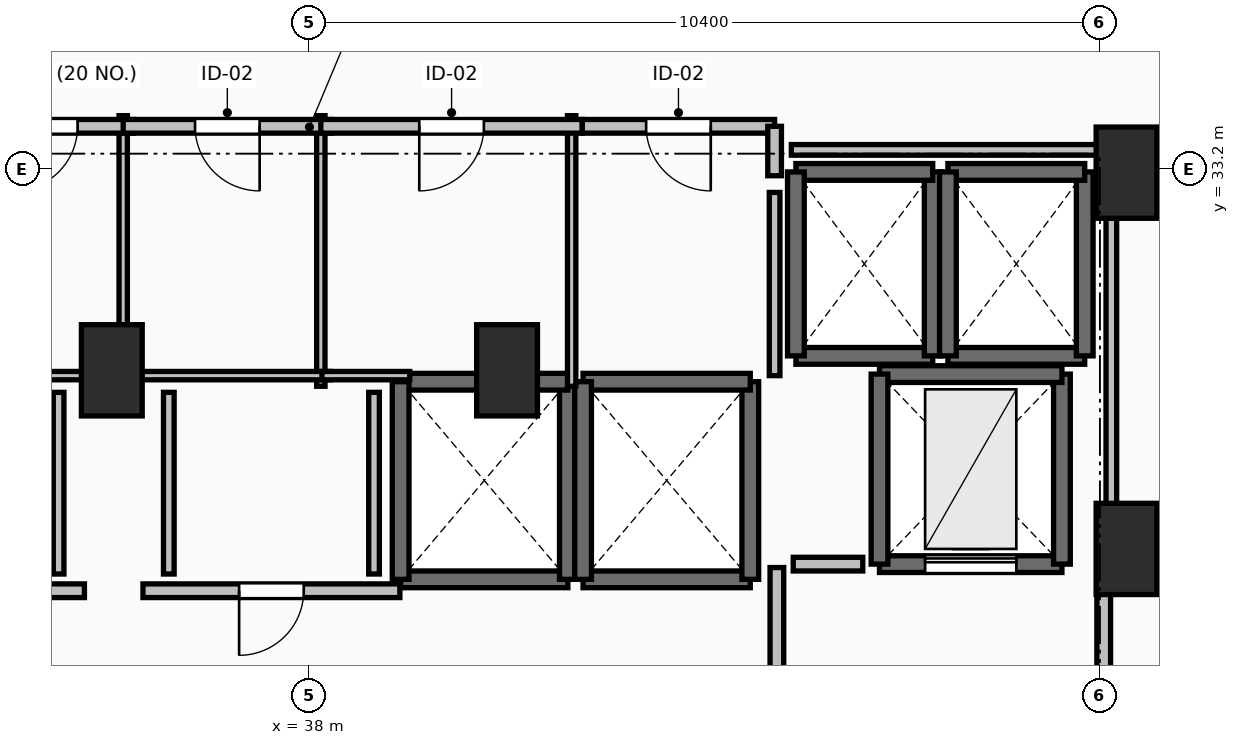
"""IFC4 building model, lengths in metres.
Left out: names, types, materials, properties, quantities, classifications, styles, units other than length and angle.
Written with IfcOpenShell. Run it as: python <this file> out.ifc"""

import sys

from ifc_helpers import new_model, si_unit, direction, frame, frame_2d, origin, origin_2d, place, context, subcontext, project, spatial, rectangle, extrude, element, fill, save


model = new_model("IFC4")
c1 = context("Model", 3, precision=1e-05, world=origin(), true_north=direction((0.0, 1.0)))
c2 = subcontext(c1, "Body", "Model", "MODEL_VIEW")
j1 = project(units=[si_unit("LENGTHUNIT", "METRE"), si_unit("PLANEANGLEUNIT", "RADIAN")], contexts=[c1])
p1 = place(None, origin())
s1 = spatial("IfcSite", under=j1, at=p1, CompositionType="ELEMENT")
p2 = place(p1, origin())
s2 = spatial("IfcBuilding", under=s1, at=p2, CompositionType="ELEMENT")
p3 = place(p2, frame((0.0, 0.0, 157.1)))
s3 = spatial("IfcBuildingStorey", under=s2, at=p3, CompositionType="ELEMENT", Elevation=157.1)
for number, where, z_axis, x_axis in (
    (1, (48.75, 33.15, 0.0), (0.0, 0.0, 1.0), (1.0, 0.0, 0.0)),
    (2, (48.75, 28.2, 0.0), (0.0, 0.0, 1.0), (1.0, 0.0, 0.0)),
    (3, (35.4, 30.55, 0.0), (0.0, 0.0, 1.0), (1.0, 0.0, 0.0)),
    (4, (40.6, 30.55, 0.0), (0.0, 0.0, 1.0), (1.0, 0.0, 0.0)),
):
    element("IfcColumn", number, at=place(p3, frame(where, z_axis=z_axis, x_axis=x_axis)), inside=s3, PredefinedType="PILASTER", context=c2, shape_type="SweptSolid", body=[
        extrude(rectangle(XDim=0.8, YDim=1.2, at=origin_2d()), origin(), (0.0, 0.0, 1.0), 3.5),
    ])
p4 = place(p3, frame((39.2, 27.8, 0.0), z_axis=(0.0, 0.0, 1.0), x_axis=(1.0, 0.0, 0.0)))
e5 = element("IfcWall", 5, at=p4, inside=s3, PredefinedType="SOLIDWALL", context=c2, shape_type="SweptSolid", body=[
    extrude(rectangle(XDim=2.2, YDim=0.22, at=frame_2d((1.1, 0.0))), origin(), (0.0, 0.0, 1.0), 3.24),
])
p5 = place(p3, frame((41.4, 27.8, 0.0), z_axis=(0.0, 0.0, 1.0), x_axis=(0.0, 1.0, 0.0)))
e6 = element("IfcWall", 6, at=p5, inside=s3, PredefinedType="SOLIDWALL", context=c2, shape_type="SweptSolid", body=[
    extrude(rectangle(XDim=2.6, YDim=0.22, at=frame_2d((1.3, 0.0))), origin(), (0.0, 0.0, 1.0), 3.24),
])
p6 = place(p3, frame((41.4, 30.4, 0.0), z_axis=(0.0, 0.0, 1.0), x_axis=(-1.0, 0.0, 0.0)))
e7 = element("IfcWall", 7, at=p6, inside=s3, PredefinedType="SOLIDWALL", context=c2, shape_type="SweptSolid", body=[
    extrude(rectangle(XDim=2.2, YDim=0.22, at=frame_2d((1.1, 0.0))), origin(), (0.0, 0.0, 1.0), 3.24),
])
p7 = place(p3, frame((39.2, 30.4, 0.0), z_axis=(0.0, 0.0, 1.0), x_axis=(0.0, -1.0, 0.0)))
e8 = element("IfcWall", 8, at=p7, inside=s3, PredefinedType="SOLIDWALL", context=c2, shape_type="SweptSolid", body=[
    extrude(rectangle(XDim=2.6, YDim=0.22, at=frame_2d((1.3, 0.0))), origin(), (0.0, 0.0, 1.0), 3.24),
])
p8 = place(p3, frame((41.6, 27.8, 0.0), z_axis=(0.0, 0.0, 1.0), x_axis=(1.0, 0.0, 0.0)))
e9 = element("IfcWall", 9, at=p8, inside=s3, PredefinedType="SOLIDWALL", context=c2, shape_type="SweptSolid", body=[
    extrude(rectangle(XDim=2.2, YDim=0.22, at=frame_2d((1.1, 0.0))), origin(), (0.0, 0.0, 1.0), 3.24),
])
p9 = place(p3, frame((43.8, 27.8, 0.0), z_axis=(0.0, 0.0, 1.0), x_axis=(0.0, 1.0, 0.0)))
e10 = element("IfcWall", 10, at=p9, inside=s3, PredefinedType="SOLIDWALL", context=c2, shape_type="SweptSolid", body=[
    extrude(rectangle(XDim=2.6, YDim=0.22, at=frame_2d((1.3, 0.0))), origin(), (0.0, 0.0, 1.0), 3.24),
])
p10 = place(p3, frame((43.8, 30.4, 0.0), z_axis=(0.0, 0.0, 1.0), x_axis=(-1.0, 0.0, 0.0)))
e11 = element("IfcWall", 11, at=p10, inside=s3, PredefinedType="SOLIDWALL", context=c2, shape_type="SweptSolid", body=[
    extrude(rectangle(XDim=2.2, YDim=0.22, at=frame_2d((1.1, 0.0))), origin(), (0.0, 0.0, 1.0), 3.24),
])
p11 = place(p3, frame((41.6, 30.4, 0.0), z_axis=(0.0, 0.0, 1.0), x_axis=(0.0, -1.0, 0.0)))
e12 = element("IfcWall", 12, at=p11, inside=s3, PredefinedType="SOLIDWALL", context=c2, shape_type="SweptSolid", body=[
    extrude(rectangle(XDim=2.6, YDim=0.22, at=frame_2d((1.3, 0.0))), origin(), (0.0, 0.0, 1.0), 3.24),
])
p12 = place(p3, frame((44.4, 30.74, 0.0), z_axis=(0.0, 0.0, 1.0), x_axis=(1.0, 0.0, 0.0)))
e13 = element("IfcWall", 13, at=p12, inside=s3, PredefinedType="SOLIDWALL", context=c2, shape_type="SweptSolid", body=[
    extrude(rectangle(XDim=1.8, YDim=0.22, at=frame_2d((0.9, 0.0))), origin(), (0.0, 0.0, 1.0), 3.24),
])
p13 = place(p3, frame((46.2, 30.74, 0.0), z_axis=(0.0, 0.0, 1.0), x_axis=(0.0, 1.0, 0.0)))
e14 = element("IfcWall", 14, at=p13, inside=s3, PredefinedType="SOLIDWALL", context=c2, shape_type="SweptSolid", body=[
    extrude(rectangle(XDim=2.42, YDim=0.22, at=frame_2d((1.21, 0.0))), origin(), (0.0, 0.0, 1.0), 3.24),
])
p14 = place(p3, frame((46.2, 33.16, 0.0), z_axis=(0.0, 0.0, 1.0), x_axis=(-1.0, 0.0, 0.0)))
e15 = element("IfcWall", 15, at=p14, inside=s3, PredefinedType="SOLIDWALL", context=c2, shape_type="SweptSolid", body=[
    extrude(rectangle(XDim=1.8, YDim=0.22, at=frame_2d((0.9, 0.0))), origin(), (0.0, 0.0, 1.0), 3.24),
])
p15 = place(p3, frame((44.4, 33.16, 0.0), z_axis=(0.0, 0.0, 1.0), x_axis=(0.0, -1.0, 0.0)))
e16 = element("IfcWall", 16, at=p15, inside=s3, PredefinedType="SOLIDWALL", context=c2, shape_type="SweptSolid", body=[
    extrude(rectangle(XDim=2.42, YDim=0.22, at=frame_2d((1.21, 0.0))), origin(), (0.0, 0.0, 1.0), 3.24),
])
p16 = place(p3, frame((46.4, 30.74, 0.0), z_axis=(0.0, 0.0, 1.0), x_axis=(1.0, 0.0, 0.0)))
e17 = element("IfcWall", 17, at=p16, inside=s3, PredefinedType="SOLIDWALL", context=c2, shape_type="SweptSolid", body=[
    extrude(rectangle(XDim=1.8, YDim=0.22, at=frame_2d((0.9, 0.0))), origin(), (0.0, 0.0, 1.0), 3.24),
])
p17 = place(p3, frame((48.2, 30.74, 0.0), z_axis=(0.0, 0.0, 1.0), x_axis=(0.0, 1.0, 0.0)))
e18 = element("IfcWall", 18, at=p17, inside=s3, PredefinedType="SOLIDWALL", context=c2, shape_type="SweptSolid", body=[
    extrude(rectangle(XDim=2.42, YDim=0.22, at=frame_2d((1.21, 0.0))), origin(), (0.0, 0.0, 1.0), 3.24),
])
p18 = place(p3, frame((48.2, 33.16, 0.0), z_axis=(0.0, 0.0, 1.0), x_axis=(-1.0, 0.0, 0.0)))
e19 = element("IfcWall", 19, at=p18, inside=s3, PredefinedType="SOLIDWALL", context=c2, shape_type="SweptSolid", body=[
    extrude(rectangle(XDim=1.8, YDim=0.22, at=frame_2d((0.9, 0.0))), origin(), (0.0, 0.0, 1.0), 3.24),
])
p19 = place(p3, frame((46.4, 33.16, 0.0), z_axis=(0.0, 0.0, 1.0), x_axis=(0.0, -1.0, 0.0)))
e20 = element("IfcWall", 20, at=p19, inside=s3, PredefinedType="SOLIDWALL", context=c2, shape_type="SweptSolid", body=[
    extrude(rectangle(XDim=2.42, YDim=0.22, at=frame_2d((1.21, 0.0))), origin(), (0.0, 0.0, 1.0), 3.24),
])
p20 = place(p3, frame((45.5, 28.0, 0.0), z_axis=(0.0, 0.0, 1.0), x_axis=(1.0, 0.0, 0.0)))
e21 = element("IfcWall", 21, at=p20, inside=s3, PredefinedType="SHEAR", context=c2, shape_type="SweptSolid", body=[
    extrude(rectangle(XDim=2.4, YDim=0.22, at=frame_2d((1.2, 0.0))), origin(), (0.0, 0.0, 1.0), 3.24),
])
p21 = place(p20, frame((0.6, 0.0, 0.0)))
e22 = element("IfcOpeningElement", 22, at=p21, cuts=e21, PredefinedType="OPENING", context=c2, shape_type="SweptSolid", body=[
    extrude(rectangle(XDim=1.2, YDim=2.2, at=frame_2d((0.6, 1.1))), frame((0.0, 0.125, 0.0), z_axis=(0.0, -1.0, 0.0), x_axis=(1.0, 0.0, 0.0)), (0.0, 0.0, 1.0), 0.25),
])
p22 = place(p3, frame((47.9, 28.0, 0.0), z_axis=(0.0, 0.0, 1.0), x_axis=(0.0, 1.0, 0.0)))
e23 = element("IfcWall", 23, at=p22, inside=s3, PredefinedType="SHEAR", context=c2, shape_type="SweptSolid", body=[
    extrude(rectangle(XDim=2.5, YDim=0.22, at=frame_2d((1.25, 0.0))), origin(), (0.0, 0.0, 1.0), 3.24),
])
p23 = place(p3, frame((47.9, 30.5, 0.0), z_axis=(0.0, 0.0, 1.0), x_axis=(-1.0, 0.0, 0.0)))
e24 = element("IfcWall", 24, at=p23, inside=s3, PredefinedType="SHEAR", context=c2, shape_type="SweptSolid", body=[
    extrude(rectangle(XDim=2.4, YDim=0.22, at=frame_2d((1.2, 0.0))), origin(), (0.0, 0.0, 1.0), 3.24),
])
p24 = place(p3, frame((45.5, 30.5, 0.0), z_axis=(0.0, 0.0, 1.0), x_axis=(0.0, -1.0, 0.0)))
e25 = element("IfcWall", 25, at=p24, inside=s3, PredefinedType="SHEAR", context=c2, shape_type="SweptSolid", body=[
    extrude(rectangle(XDim=2.5, YDim=0.22, at=frame_2d((1.25, 0.0))), origin(), (0.0, 0.0, 1.0), 3.24),
])
p25 = place(p3, frame((44.15, 27.955, 0.0), z_axis=(0.0, 0.0, 1.0), x_axis=(0.0, -1.0, 0.0)))
e26 = element("IfcWall", 26, at=p25, inside=s3, PredefinedType="PARTITIONING", context=c2, shape_type="SweptSolid", body=[
    extrude(rectangle(XDim=3.91, YDim=0.18, at=frame_2d((1.955, 0.0))), origin(), (0.0, 0.0, 1.0), 3.24),
])
p26 = place(p25, frame((1.355, 0.0, 0.0)))
e27 = element("IfcOpeningElement", 27, at=p26, cuts=e26, PredefinedType="OPENING", context=c2, shape_type="SweptSolid", body=[
    extrude(rectangle(XDim=1.2, YDim=2.15, at=frame_2d((0.6, 1.075))), frame((0.0, 0.105, 0.0), z_axis=(0.0, -1.0, 0.0), x_axis=(1.0, 0.0, 0.0)), (0.0, 0.0, 1.0), 0.21),
])
p27 = place(p3, frame((48.45, 23.95, 0.0), z_axis=(0.0, 0.0, 1.0), x_axis=(0.0, 1.0, 0.0)))
e28 = element("IfcWall", 28, at=p27, inside=s3, PredefinedType="PARTITIONING", context=c2, shape_type="SweptSolid", body=[
    extrude(rectangle(XDim=4.05, YDim=0.18, at=frame_2d((2.025, 0.0))), origin(), (0.0, 0.0, 1.0), 3.24),
])
p28 = place(p27, frame((1.425, 0.0, 0.0)))
e29 = element("IfcOpeningElement", 29, at=p28, cuts=e28, PredefinedType="OPENING", context=c2, shape_type="SweptSolid", body=[
    extrude(rectangle(XDim=1.2, YDim=2.15, at=frame_2d((0.6, 1.075))), frame((0.0, 0.105, 0.0), z_axis=(0.0, -1.0, 0.0), x_axis=(1.0, 0.0, 0.0)), (0.0, 0.0, 1.0), 0.21),
])
p29 = place(p3, frame((35.04, 27.65, 0.0), z_axis=(0.0, 0.0, 1.0), x_axis=(-1.0, 0.0, 0.0)))
e30 = element("IfcWall", 30, at=p29, inside=s3, PredefinedType="PARTITIONING", context=c2, shape_type="SweptSolid", body=[
    extrude(rectangle(XDim=3.04, YDim=0.18, at=frame_2d((1.52, 0.0))), origin(), (0.0, 0.0, 1.0), 3.24),
])
p30 = place(p29, frame((1.02, 0.0, 0.0)))
e31 = element("IfcOpeningElement", 31, at=p30, cuts=e30, PredefinedType="OPENING", context=c2, shape_type="SweptSolid", body=[
    extrude(rectangle(XDim=1.0, YDim=2.15, at=frame_2d((0.5, 1.075))), frame((0.0, 0.105, 0.0), z_axis=(0.0, -1.0, 0.0), x_axis=(1.0, 0.0, 0.0)), (0.0, 0.0, 1.0), 0.21),
])
p31 = place(p3, frame((39.19, 27.65, 0.0), z_axis=(0.0, 0.0, 1.0), x_axis=(-1.0, 0.0, 0.0)))
e32 = element("IfcWall", 32, at=p31, inside=s3, PredefinedType="PARTITIONING", context=c2, shape_type="SweptSolid", body=[
    extrude(rectangle(XDim=3.38, YDim=0.18, at=frame_2d((1.69, 0.0))), origin(), (0.0, 0.0, 1.0), 3.24),
])
p32 = place(p31, frame((1.265, 0.0, 0.0)))
e33 = element("IfcOpeningElement", 33, at=p32, cuts=e32, PredefinedType="OPENING", context=c2, shape_type="SweptSolid", body=[
    extrude(rectangle(XDim=0.85, YDim=2.1, at=frame_2d((0.425, 1.05))), frame((0.0, 0.105, 0.0), z_axis=(0.0, -1.0, 0.0), x_axis=(1.0, 0.0, 0.0)), (0.0, 0.0, 1.0), 0.21),
])
p33 = place(p3, frame((35.55, 30.34, 0.0), z_axis=(0.0, 0.0, 1.0), x_axis=(0.0, 1.0, 0.0)))
e34 = element("IfcWall", 34, at=p33, inside=s3, PredefinedType="PARTITIONING", context=c2, shape_type="SweptSolid", body=[
    extrude(rectangle(XDim=3.56, YDim=0.11, at=frame_2d((1.78, 0.0))), origin(), (0.0, 0.0, 1.0), 2.432),
])
p34 = place(p3, frame((33.36, 30.48, 0.0), z_axis=(0.0, 0.0, 1.0), x_axis=(1.0, 0.0, 0.0)))
e35 = element("IfcWall", 35, at=p34, inside=s3, PredefinedType="PARTITIONING", context=c2, shape_type="SweptSolid", body=[
    extrude(rectangle(XDim=1.81, YDim=0.11, at=frame_2d((0.905, 0.0))), origin(), (0.0, 0.0, 1.0), 3.24),
])
p35 = place(p3, frame((35.69, 33.76, 0.0), z_axis=(0.0, 0.0, 1.0), x_axis=(-1.0, 0.0, 0.0)))
e36 = element("IfcWall", 36, at=p35, inside=s3, PredefinedType="PARTITIONING", context=c2, shape_type="SweptSolid", body=[
    extrude(rectangle(XDim=2.33, YDim=0.18, at=frame_2d((1.165, 0.0))), origin(), (0.0, 0.0, 1.0), 3.24),
])
p36 = place(p35, frame((0.74, 0.0, 0.0)))
e37 = element("IfcOpeningElement", 37, at=p36, cuts=e36, PredefinedType="OPENING", context=c2, shape_type="SweptSolid", body=[
    extrude(rectangle(XDim=0.85, YDim=2.1, at=frame_2d((0.425, 1.05))), frame((0.0, 0.105, 0.0), z_axis=(0.0, -1.0, 0.0), x_axis=(1.0, 0.0, 0.0)), (0.0, 0.0, 1.0), 0.21),
])
p37 = place(p3, frame((38.15, 30.34, 0.0), z_axis=(0.0, 0.0, 1.0), x_axis=(0.0, 1.0, 0.0)))
e38 = element("IfcWall", 38, at=p37, inside=s3, PredefinedType="PARTITIONING", context=c2, shape_type="SweptSolid", body=[
    extrude(rectangle(XDim=3.56, YDim=0.11, at=frame_2d((1.78, 0.0))), origin(), (0.0, 0.0, 1.0), 2.432),
])
p38 = place(p3, frame((35.68, 30.48, 0.0), z_axis=(0.0, 0.0, 1.0), x_axis=(1.0, 0.0, 0.0)))
e39 = element("IfcWall", 39, at=p38, inside=s3, PredefinedType="PARTITIONING", context=c2, shape_type="SweptSolid", body=[
    extrude(rectangle(XDim=2.595, YDim=0.11, at=frame_2d((1.297, 0.0))), origin(), (0.0, 0.0, 1.0), 2.432),
])
p39 = place(p3, frame((38.29, 33.76, 0.0), z_axis=(0.0, 0.0, 1.0), x_axis=(-1.0, 0.0, 0.0)))
e40 = element("IfcWall", 40, at=p39, inside=s3, PredefinedType="PARTITIONING", context=c2, shape_type="SweptSolid", body=[
    extrude(rectangle(XDim=2.74, YDim=0.18, at=frame_2d((1.37, 0.0))), origin(), (0.0, 0.0, 1.0), 3.24),
])
p40 = place(p39, frame((0.945, 0.0, 0.0)))
e41 = element("IfcOpeningElement", 41, at=p40, cuts=e40, PredefinedType="OPENING", context=c2, shape_type="SweptSolid", body=[
    extrude(rectangle(XDim=0.85, YDim=2.1, at=frame_2d((0.425, 1.05))), frame((0.0, 0.105, 0.0), z_axis=(0.0, -1.0, 0.0), x_axis=(1.0, 0.0, 0.0)), (0.0, 0.0, 1.0), 0.21),
])
p41 = place(p3, frame((41.45, 30.34, 0.0), z_axis=(0.0, 0.0, 1.0), x_axis=(0.0, 1.0, 0.0)))
e42 = element("IfcWall", 42, at=p41, inside=s3, PredefinedType="PARTITIONING", context=c2, shape_type="SweptSolid", body=[
    extrude(rectangle(XDim=3.56, YDim=0.11, at=frame_2d((1.78, 0.0))), origin(), (0.0, 0.0, 1.0), 3.24),
])
p42 = place(p3, frame((38.165, 30.48, 0.0), z_axis=(0.0, 0.0, 1.0), x_axis=(1.0, 0.0, 0.0)))
e43 = element("IfcWall", 43, at=p42, inside=s3, PredefinedType="PARTITIONING", context=c2, shape_type="SweptSolid", body=[
    extrude(rectangle(XDim=1.155, YDim=0.11, at=frame_2d((0.578, 0.0))), origin(), (0.0, 0.0, 1.0), 2.432),
])
p43 = place(p3, frame((41.59, 33.76, 0.0), z_axis=(0.0, 0.0, 1.0), x_axis=(-1.0, 0.0, 0.0)))
e44 = element("IfcWall", 44, at=p43, inside=s3, PredefinedType="PARTITIONING", context=c2, shape_type="SweptSolid", body=[
    extrude(rectangle(XDim=3.44, YDim=0.18, at=frame_2d((1.72, 0.0))), origin(), (0.0, 0.0, 1.0), 3.24),
])
p44 = place(p43, frame((1.295, 0.0, 0.0)))
e45 = element("IfcOpeningElement", 45, at=p44, cuts=e44, PredefinedType="OPENING", context=c2, shape_type="SweptSolid", body=[
    extrude(rectangle(XDim=0.85, YDim=2.1, at=frame_2d((0.425, 1.05))), frame((0.0, 0.105, 0.0), z_axis=(0.0, -1.0, 0.0), x_axis=(1.0, 0.0, 0.0)), (0.0, 0.0, 1.0), 0.21),
])
p45 = place(p3, frame((44.12, 33.76, 0.0), z_axis=(0.0, 0.0, 1.0), x_axis=(-1.0, 0.0, 0.0)))
e46 = element("IfcWall", 46, at=p45, inside=s3, PredefinedType="PARTITIONING", context=c2, shape_type="SweptSolid", body=[
    extrude(rectangle(XDim=2.53, YDim=0.18, at=frame_2d((1.265, 0.0))), origin(), (0.0, 0.0, 1.0), 3.24),
])
p46 = place(p45, frame((0.84, 0.0, 0.0)))
e47 = element("IfcOpeningElement", 47, at=p46, cuts=e46, PredefinedType="OPENING", context=c2, shape_type="SweptSolid", body=[
    extrude(rectangle(XDim=0.85, YDim=2.1, at=frame_2d((0.425, 1.05))), frame((0.0, 0.105, 0.0), z_axis=(0.0, -1.0, 0.0), x_axis=(1.0, 0.0, 0.0)), (0.0, 0.0, 1.0), 0.21),
])
p47 = place(p3, frame((44.12, 33.11, 0.0), z_axis=(0.0, 0.0, 1.0), x_axis=(0.0, 1.0, 0.0)))
e48 = element("IfcWall", 48, at=p47, inside=s3, PredefinedType="PARTITIONING", context=c2, shape_type="SweptSolid", body=[
    extrude(rectangle(XDim=0.65, YDim=0.18, at=frame_2d((0.325, 0.0))), origin(), (0.0, 0.0, 1.0), 3.24),
])
p48 = place(p3, frame((45.28, 28.0, 0.0), z_axis=(0.0, 0.0, 1.0), x_axis=(-1.0, 0.0, 0.0)))
e49 = element("IfcWall", 49, at=p48, inside=s3, PredefinedType="PARTITIONING", context=c2, shape_type="SweptSolid", body=[
    extrude(rectangle(XDim=0.915, YDim=0.18, at=frame_2d((0.458, 0.0))), origin(), (0.0, 0.0, 1.0), 3.24),
])
p49 = place(p3, frame((44.12, 30.48, 0.0), z_axis=(0.0, 0.0, 1.0), x_axis=(0.0, 1.0, 0.0)))
e50 = element("IfcWall", 50, at=p49, inside=s3, PredefinedType="PARTITIONING", context=c2, shape_type="SweptSolid", body=[
    extrude(rectangle(XDim=2.41, YDim=0.14, at=frame_2d((1.205, 0.0))), origin(), (0.0, 0.0, 1.0), 3.24),
])
for number, where, z_axis, x_axis in (
    (51, (34.7, 27.87, 0.0), (0.0, 0.0, 1.0), (0.0, 1.0, 0.0)),
    (52, (36.15, 30.26, 0.0), (0.0, 0.0, 1.0), (0.0, -1.0, 0.0)),
    (53, (38.85, 27.87, 0.0), (0.0, 0.0, 1.0), (0.0, 1.0, 0.0)),
):
    element("IfcWall", number, at=place(p3, frame(where, z_axis=z_axis, x_axis=x_axis)), inside=s3, PredefinedType="PARTITIONING", context=c2, shape_type="SweptSolid", body=[
        extrude(rectangle(XDim=2.39, YDim=0.14, at=frame_2d((1.195, 0.0))), origin(), (0.0, 0.0, 1.0), 3.24),
    ])
p50 = place(p3, frame((48.55, 28.196, 0.0), z_axis=(0.0, 0.0, 1.0), x_axis=(0.0, 1.0, 0.0)))
e54 = element("IfcWall", 54, at=p50, inside=s3, PredefinedType="PARTITIONING", context=c2, shape_type="SweptSolid", body=[
    extrude(rectangle(XDim=5.254, YDim=0.14, at=frame_2d((2.627, 0.0))), origin(), (0.0, 0.0, 1.0), 2.432),
])
p51 = place(p3, frame((48.55, 33.45, 0.0), z_axis=(0.0, 0.0, 1.0), x_axis=(-1.0, 0.0, 0.0)))
e55 = element("IfcWall", 55, at=p51, inside=s3, PredefinedType="PARTITIONING", context=c2, shape_type="SweptSolid", body=[
    extrude(rectangle(XDim=4.21, YDim=0.14, at=frame_2d((2.105, 0.0))), origin(), (0.0, 0.0, 1.0), 2.432),
])
p52 = place(p21, origin())
e56 = element("IfcDoor", 56, at=p52, inside=s3, OperationType="SLIDING_TO_LEFT", PredefinedType="DOOR", context=c2, shape_type="SweptSolid", body=[
    extrude(rectangle(XDim=1.2, YDim=2.2, at=frame_2d((0.6, 1.1))), frame((0.0, 0.025, 0.0), z_axis=(0.0, -1.0, 0.0), x_axis=(1.0, 0.0, 0.0)), (0.0, 0.0, 1.0), 0.05),
])
fill(e22, e56)
p53 = place(p32, origin())
e57 = element("IfcDoor", 57, at=p53, inside=s3, OperationType="SINGLE_SWING_RIGHT", PredefinedType="DOOR", context=c2, shape_type="SweptSolid", body=[
    extrude(rectangle(XDim=0.85, YDim=2.1, at=frame_2d((0.425, 1.05))), frame((0.0, 0.025, 0.0), z_axis=(0.0, -1.0, 0.0), x_axis=(1.0, 0.0, 0.0)), (0.0, 0.0, 1.0), 0.05),
])
fill(e33, e57)
p54 = place(p36, origin())
e58 = element("IfcDoor", 58, at=p54, inside=s3, OperationType="SINGLE_SWING_RIGHT", PredefinedType="DOOR", context=c2, shape_type="SweptSolid", body=[
    extrude(rectangle(XDim=0.85, YDim=2.1, at=frame_2d((0.425, 1.05))), frame((0.0, 0.025, 0.0), z_axis=(0.0, -1.0, 0.0), x_axis=(1.0, 0.0, 0.0)), (0.0, 0.0, 1.0), 0.05),
])
fill(e37, e58)
p55 = place(p40, origin())
e59 = element("IfcDoor", 59, at=p55, inside=s3, OperationType="SINGLE_SWING_LEFT", PredefinedType="DOOR", context=c2, shape_type="SweptSolid", body=[
    extrude(rectangle(XDim=0.85, YDim=2.1, at=frame_2d((0.425, 1.05))), frame((0.0, 0.025, 0.0), z_axis=(0.0, -1.0, 0.0), x_axis=(1.0, 0.0, 0.0)), (0.0, 0.0, 1.0), 0.05),
])
fill(e41, e59)
p56 = place(p44, origin())
e60 = element("IfcDoor", 60, at=p56, inside=s3, OperationType="SINGLE_SWING_RIGHT", PredefinedType="DOOR", context=c2, shape_type="SweptSolid", body=[
    extrude(rectangle(XDim=0.85, YDim=2.1, at=frame_2d((0.425, 1.05))), frame((0.0, 0.025, 0.0), z_axis=(0.0, -1.0, 0.0), x_axis=(1.0, 0.0, 0.0)), (0.0, 0.0, 1.0), 0.05),
])
fill(e45, e60)
p57 = place(p46, origin())
e61 = element("IfcDoor", 61, at=p57, inside=s3, OperationType="SINGLE_SWING_LEFT", PredefinedType="DOOR", context=c2, shape_type="SweptSolid", body=[
    extrude(rectangle(XDim=0.85, YDim=2.1, at=frame_2d((0.425, 1.05))), frame((0.0, 0.025, 0.0), z_axis=(0.0, -1.0, 0.0), x_axis=(1.0, 0.0, 0.0)), (0.0, 0.0, 1.0), 0.05),
])
fill(e47, e61)
save(model, sys.argv[1])
